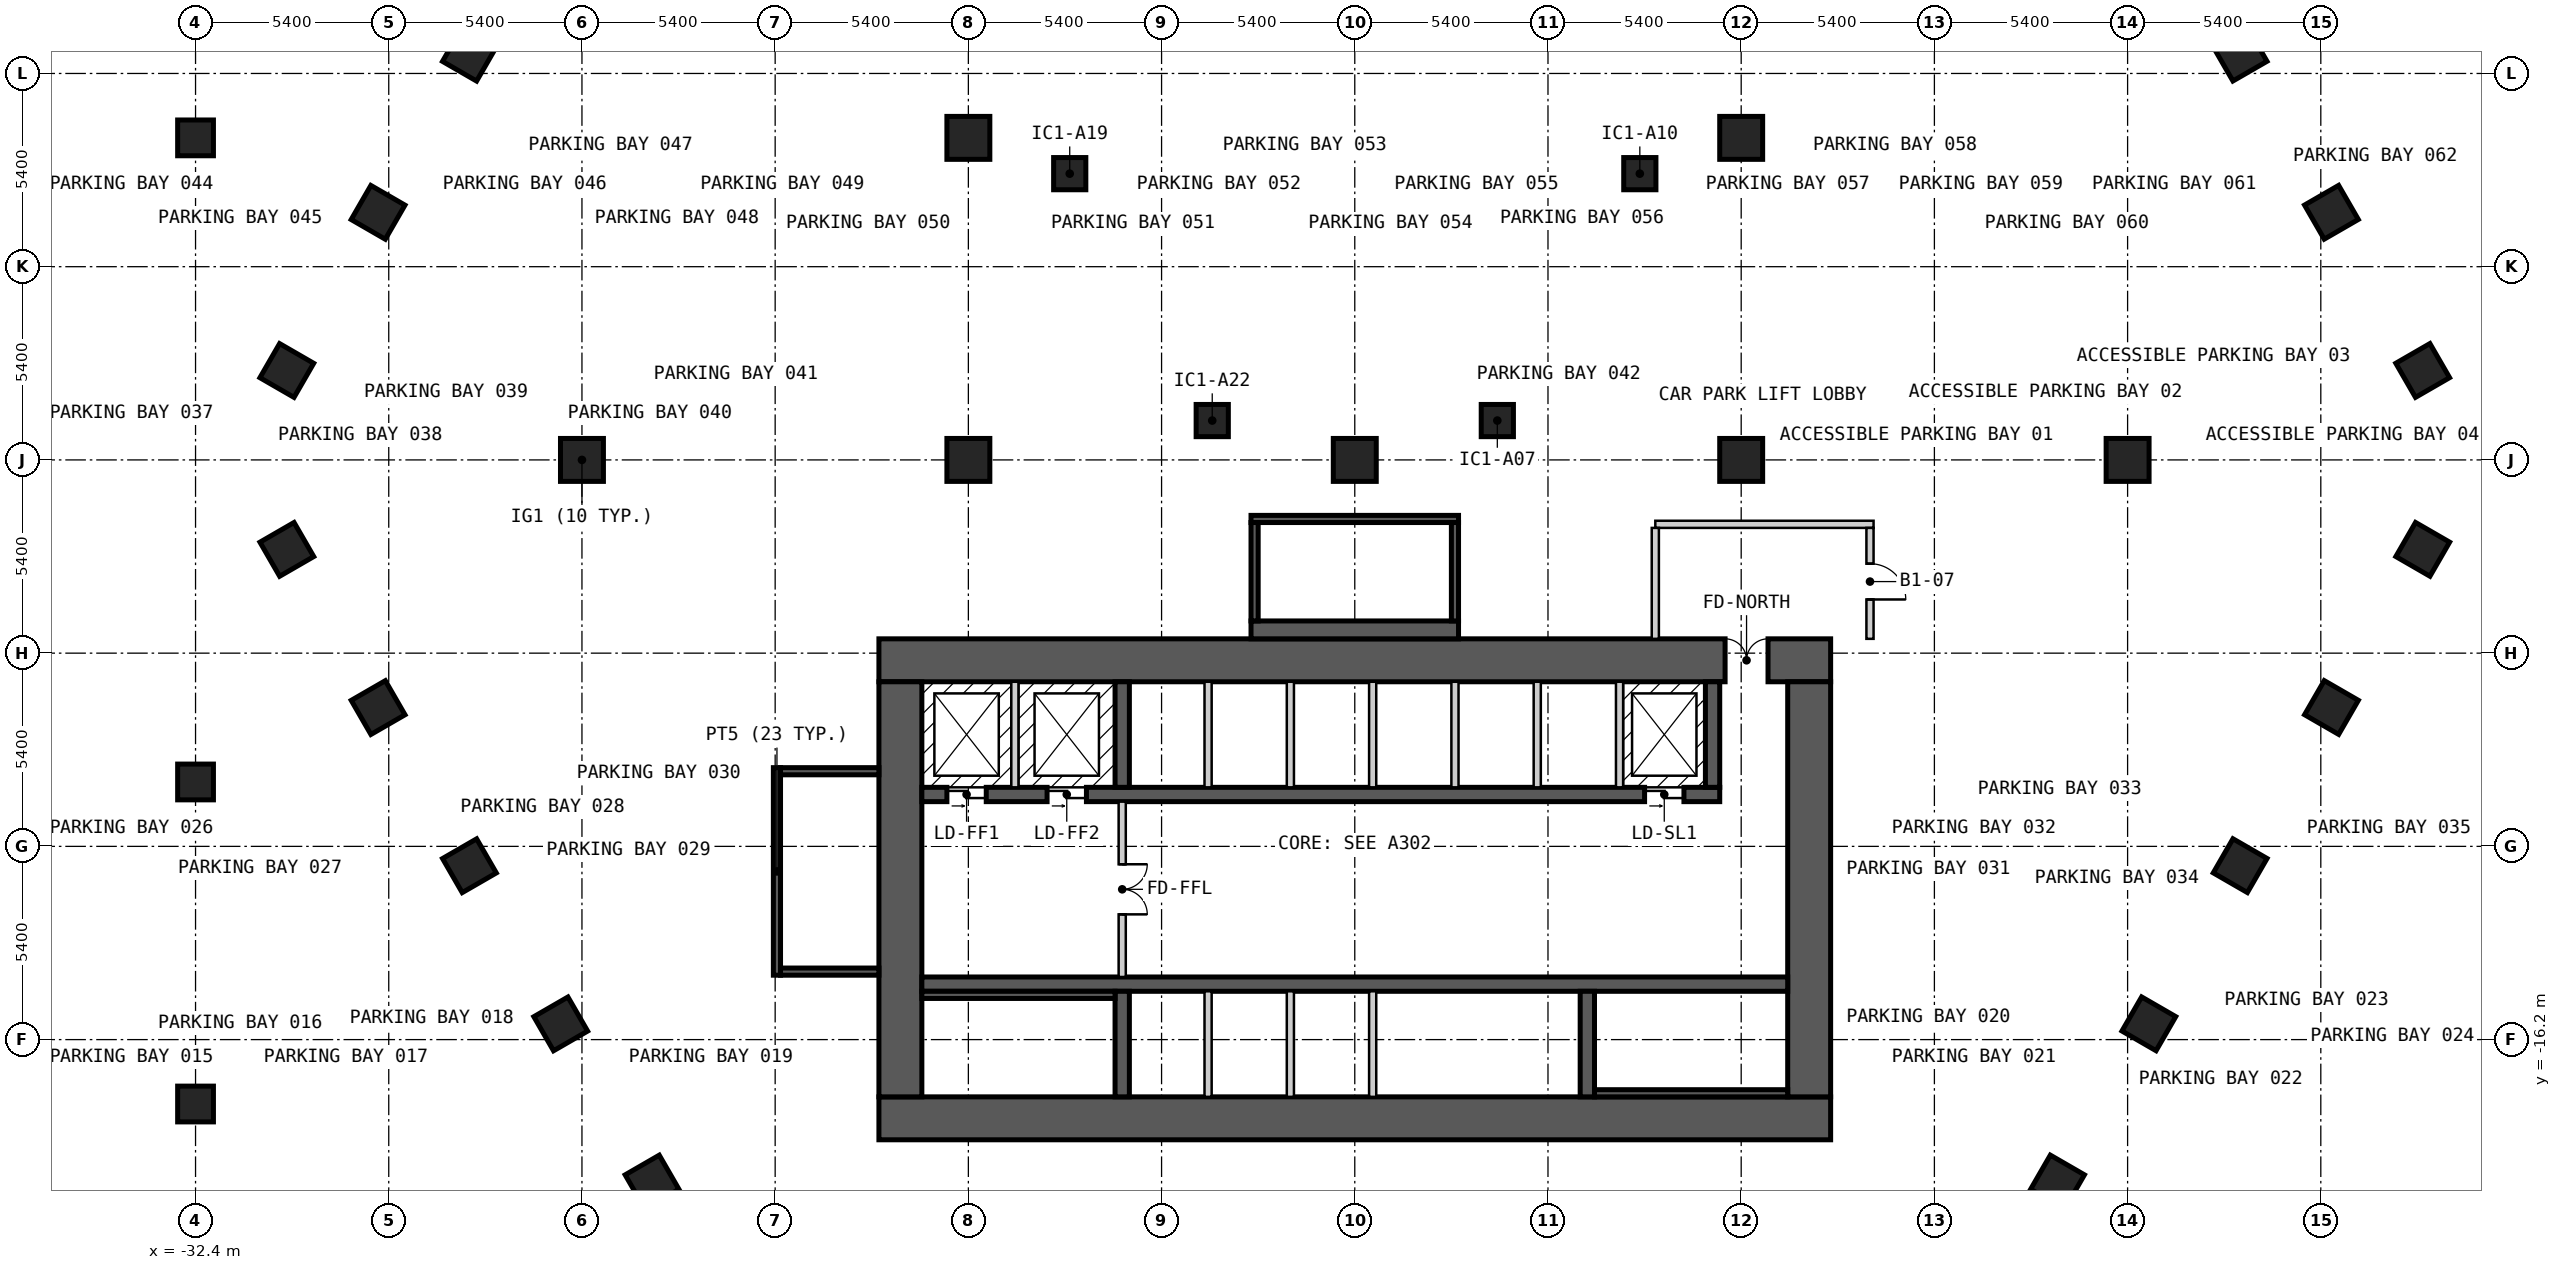
"""IFC4 building model, lengths in metres.
Left out: names, types, materials, properties, quantities, classifications, styles, units other than length and angle.
Written with IfcOpenShell. Run it as: python <this file> out.ifc"""

import sys

from ifc_helpers import new_model, si_unit, direction, frame, frame_2d, origin, origin_2d, place, context, subcontext, project, spatial, rectangle, extrude, element, fill, save


model = new_model("IFC4")
c1 = context("Model", 3, precision=1e-05, world=origin(), true_north=direction((0.0, 1.0)))
c2 = subcontext(c1, "Body", "Model", "MODEL_VIEW")
j1 = project(units=[si_unit("LENGTHUNIT", "METRE"), si_unit("PLANEANGLEUNIT", "RADIAN")], contexts=[c1])
p1 = place(None, origin())
s1 = spatial("IfcSite", under=j1, at=p1, CompositionType="ELEMENT")
p2 = place(p1, origin())
s2 = spatial("IfcBuilding", under=s1, at=p2, CompositionType="ELEMENT")
p3 = place(p2, frame((0.0, 0.0, -4.2)))
s3 = spatial("IfcBuildingStorey", under=s2, at=p3, CompositionType="ELEMENT", Elevation=-4.2)
for number, where, z_axis, x_axis in (
    (1, (-24.746, 11.339, 0.0), (0.0, 0.0, 1.0), (-0.5, -0.866, 0.0)),
    (2, (-27.298, 6.919, 0.0), (0.0, 0.0, 1.0), (-0.5, -0.866, 0.0)),
    (3, (-29.849, 2.499, 0.0), (0.0, 0.0, 1.0), (-0.5, -0.866, 0.0)),
    (4, (-29.848, -2.5, 0.0), (0.0, 0.0, 1.0), (0.5, -0.866, 0.0)),
    (5, (-27.297, -6.921, 0.0), (0.0, 0.0, 1.0), (0.5, -0.866, 0.0)),
    (6, (-24.745, -11.341, 0.0), (0.0, 0.0, 1.0), (0.5, -0.866, 0.0)),
    (7, (-22.193, -15.761, 0.0), (0.0, 0.0, 1.0), (0.5, -0.866, 0.0)),
    (8, (-19.641, -20.181, 0.0), (0.0, 0.0, 1.0), (0.5, -0.866, 0.0)),
    (9, (19.642, -20.18, 0.0), (0.0, 0.0, 1.0), (0.5, 0.866, 0.0)),
    (10, (22.194, -15.759, 0.0), (0.0, 0.0, 1.0), (0.5, 0.866, 0.0)),
    (11, (24.746, -11.339, 0.0), (0.0, 0.0, 1.0), (0.5, 0.866, 0.0)),
    (12, (27.298, -6.919, 0.0), (0.0, 0.0, 1.0), (0.5, 0.866, 0.0)),
    (13, (29.849, -2.499, 0.0), (0.0, 0.0, 1.0), (0.5, 0.866, 0.0)),
    (14, (29.848, 2.5, 0.0), (0.0, 0.0, 1.0), (-0.5, 0.866, 0.0)),
    (15, (27.297, 6.921, 0.0), (0.0, 0.0, 1.0), (-0.5, 0.866, 0.0)),
    (16, (24.745, 11.341, 0.0), (0.0, 0.0, 1.0), (-0.5, 0.866, 0.0)),
):
    element("IfcColumn", number, at=place(p3, frame(where, z_axis=z_axis, x_axis=x_axis)), inside=s3, PredefinedType="COLUMN", context=c2, shape_type="SweptSolid", body=[
        extrude(rectangle(XDim=1.1, YDim=1.1, at=origin_2d()), origin(), (0.0, 0.0, 1.0), 4.2),
    ])
for number, where, z_axis, x_axis in (
    (17, (3.984, 1.1, 0.0), (0.0, 0.0, 1.0), (1.0, 0.0, 0.0)),
    (18, (7.967, 8.0, 0.0), (0.0, 0.0, 1.0), (1.0, 0.0, 0.0)),
    (19, (-7.967, 8.0, 0.0), (0.0, 0.0, 1.0), (1.0, 0.0, 0.0)),
    (20, (-3.984, 1.1, 0.0), (0.0, 0.0, 1.0), (1.0, 0.0, 0.0)),
):
    element("IfcColumn", number, at=place(p3, frame(where, z_axis=z_axis, x_axis=x_axis)), inside=s3, PredefinedType="COLUMN", context=c2, shape_type="SweptSolid", body=[
        extrude(rectangle(XDim=0.9, YDim=0.9, at=origin_2d()), origin(), (0.0, 0.0, 1.0), 4.2),
    ])
for number, where, z_axis, x_axis in (
    (21, (-21.6, 0.0, 0.0), (0.0, 0.0, 1.0), (1.0, 0.0, 0.0)),
    (22, (-10.8, 0.0, 0.0), (0.0, 0.0, 1.0), (1.0, 0.0, 0.0)),
    (23, (-10.8, 9.0, 0.0), (0.0, 0.0, 1.0), (1.0, 0.0, 0.0)),
    (24, (0.0, 0.0, 0.0), (0.0, 0.0, 1.0), (1.0, 0.0, 0.0)),
    (25, (10.8, 0.0, 0.0), (0.0, 0.0, 1.0), (1.0, 0.0, 0.0)),
    (26, (10.8, 9.0, 0.0), (0.0, 0.0, 1.0), (1.0, 0.0, 0.0)),
    (27, (21.6, 0.0, 0.0), (0.0, 0.0, 1.0), (1.0, 0.0, 0.0)),
):
    element("IfcColumn", number, at=place(p3, frame(where, z_axis=z_axis, x_axis=x_axis)), inside=s3, PredefinedType="COLUMN", context=c2, shape_type="SweptSolid", body=[
        extrude(rectangle(XDim=1.2, YDim=1.2, at=origin_2d()), origin(), (0.0, 0.0, 1.0), 4.2),
    ])
for number, where, z_axis, x_axis in (
    (28, (-32.4, -18.0, 0.0), (0.0, 0.0, 1.0), (1.0, 0.0, 0.0)),
    (29, (-32.4, -9.0, 0.0), (0.0, 0.0, 1.0), (1.0, 0.0, 0.0)),
    (30, (-32.4, 9.0, 0.0), (0.0, 0.0, 1.0), (1.0, 0.0, 0.0)),
):
    element("IfcColumn", number, at=place(p3, frame(where, z_axis=z_axis, x_axis=x_axis)), inside=s3, PredefinedType="COLUMN", context=c2, shape_type="SweptSolid", body=[
        extrude(rectangle(XDim=1.0, YDim=1.0, at=origin_2d()), origin(), (0.0, 0.0, 1.0), 4.2),
    ])
p4 = place(p3, frame((-13.3, -18.4, 0.0), z_axis=(0.0, 0.0, 1.0), x_axis=(1.0, 0.0, 0.0)))
e31 = element("IfcWall", 31, at=p4, inside=s3, PredefinedType="SHEAR", context=c2, shape_type="SweptSolid", body=[
    extrude(rectangle(XDim=26.6, YDim=1.2, at=frame_2d((13.3, 0.0))), origin(), (0.0, 0.0, 1.0), 3.75),
])
p5 = place(p3, frame((-13.3, -5.6, 0.0), z_axis=(0.0, 0.0, 1.0), x_axis=(1.0, 0.0, 0.0)))
e32 = element("IfcWall", 32, at=p5, inside=s3, PredefinedType="SHEAR", context=c2, shape_type="SweptSolid", body=[
    extrude(rectangle(XDim=26.6, YDim=1.2, at=frame_2d((13.3, 0.0))), origin(), (0.0, 0.0, 1.0), 3.75),
])
p6 = place(p5, frame((23.65, 0.0, 0.0)))
e33 = element("IfcOpeningElement", 33, at=p6, cuts=e32, PredefinedType="OPENING", context=c2, shape_type="SweptSolid", body=[
    extrude(rectangle(XDim=1.2, YDim=2.1, at=frame_2d((0.6, 1.05))), frame((0.0, 0.61, 0.0), z_axis=(0.0, -1.0, 0.0), x_axis=(1.0, 0.0, 0.0)), (0.0, 0.0, 1.0), 1.22),
])
for number, where, z_axis, x_axis in (
    (34, (-12.7, -17.8, 0.0), (0.0, 0.0, 1.0), (0.0, 1.0, 0.0)),
    (35, (12.7, -17.8, 0.0), (0.0, 0.0, 1.0), (0.0, 1.0, 0.0)),
):
    element("IfcWall", number, at=place(p3, frame(where, z_axis=z_axis, x_axis=x_axis)), inside=s3, PredefinedType="SHEAR", context=c2, shape_type="SweptSolid", body=[
        extrude(rectangle(XDim=11.6, YDim=1.2, at=frame_2d((5.8, 0.0))), origin(), (0.0, 0.0, 1.0), 3.75),
    ])
p7 = place(p3, frame((-12.1, -14.65, 0.0), z_axis=(0.0, 0.0, 1.0), x_axis=(1.0, 0.0, 0.0)))
e36 = element("IfcWall", 36, at=p7, inside=s3, PredefinedType="SHEAR", context=c2, shape_type="SweptSolid", body=[
    extrude(rectangle(XDim=24.2, YDim=0.4, at=frame_2d((12.1, 0.0))), origin(), (0.0, 0.0, 1.0), 3.75),
])
p8 = place(p3, frame((-12.1, -9.35, 0.0), z_axis=(0.0, 0.0, 1.0), x_axis=(1.0, 0.0, 0.0)))
e37 = element("IfcWall", 37, at=p8, inside=s3, PredefinedType="SHEAR", context=c2, shape_type="SweptSolid", body=[
    extrude(rectangle(XDim=22.3, YDim=0.4, at=frame_2d((11.15, 0.0))), origin(), (0.0, 0.0, 1.0), 3.75),
])
p9 = place(p8, frame((0.7, 0.0, 0.0)))
e38 = element("IfcOpeningElement", 38, at=p9, cuts=e37, PredefinedType="OPENING", context=c2, shape_type="SweptSolid", body=[
    extrude(rectangle(XDim=1.1, YDim=2.1, at=frame_2d((0.55, 1.05))), frame((0.0, 0.21, 0.0), z_axis=(0.0, -1.0, 0.0), x_axis=(1.0, 0.0, 0.0)), (0.0, 0.0, 1.0), 0.42),
])
p10 = place(p8, frame((3.5, 0.0, 0.0)))
e39 = element("IfcOpeningElement", 39, at=p10, cuts=e37, PredefinedType="OPENING", context=c2, shape_type="SweptSolid", body=[
    extrude(rectangle(XDim=1.1, YDim=2.1, at=frame_2d((0.55, 1.05))), frame((0.0, 0.21, 0.0), z_axis=(0.0, -1.0, 0.0), x_axis=(1.0, 0.0, 0.0)), (0.0, 0.0, 1.0), 0.42),
])
p11 = place(p8, frame((20.2, 0.0, 0.0)))
e40 = element("IfcOpeningElement", 40, at=p11, cuts=e37, PredefinedType="OPENING", context=c2, shape_type="SweptSolid", body=[
    extrude(rectangle(XDim=1.1, YDim=2.1, at=frame_2d((0.55, 1.05))), frame((0.0, 0.21, 0.0), z_axis=(0.0, -1.0, 0.0), x_axis=(1.0, 0.0, 0.0)), (0.0, 0.0, 1.0), 0.42),
])
for number, where, z_axis, x_axis in (
    (41, (-6.5, -17.8, 0.0), (0.0, 0.0, 1.0), (0.0, 1.0, 0.0)),
    (42, (6.5, -17.8, 0.0), (0.0, 0.0, 1.0), (0.0, 1.0, 0.0)),
    (43, (-6.5, -9.15, 0.0), (0.0, 0.0, 1.0), (0.0, 1.0, 0.0)),
    (44, (10.0, -9.15, 0.0), (0.0, 0.0, 1.0), (0.0, 1.0, 0.0)),
):
    element("IfcWall", number, at=place(p3, frame(where, z_axis=z_axis, x_axis=x_axis)), inside=s3, PredefinedType="SHEAR", context=c2, shape_type="SweptSolid", body=[
        extrude(rectangle(XDim=2.95, YDim=0.4, at=frame_2d((1.475, 0.0))), origin(), (0.0, 0.0, 1.0), 3.75),
    ])
p12 = place(p3, frame((8.4, -1.8, 0.0), z_axis=(0.0, 0.0, 1.0), x_axis=(1.0, 0.0, 0.0)))
e45 = element("IfcWall", 45, at=p12, inside=s3, PredefinedType="PARTITIONING", context=c2, shape_type="SweptSolid", body=[
    extrude(rectangle(XDim=6.1, YDim=0.2, at=frame_2d((3.05, 0.0))), origin(), (0.0, 0.0, 1.0), 3.75),
])
p13 = place(p3, frame((8.4, -5.0, 0.0), z_axis=(0.0, 0.0, 1.0), x_axis=(0.0, 1.0, 0.0)))
e46 = element("IfcWall", 46, at=p13, inside=s3, PredefinedType="PARTITIONING", context=c2, shape_type="SweptSolid", body=[
    extrude(rectangle(XDim=3.1, YDim=0.2, at=frame_2d((1.55, 0.0))), origin(), (0.0, 0.0, 1.0), 3.75),
])
p14 = place(p3, frame((14.4, -5.0, 0.0), z_axis=(0.0, 0.0, 1.0), x_axis=(0.0, 1.0, 0.0)))
e47 = element("IfcWall", 47, at=p14, inside=s3, PredefinedType="PARTITIONING", context=c2, shape_type="SweptSolid", body=[
    extrude(rectangle(XDim=3.1, YDim=0.2, at=frame_2d((1.55, 0.0))), origin(), (0.0, 0.0, 1.0), 3.75),
])
p15 = place(p14, frame((2.1, 0.0, 0.0), z_axis=(0.0, 0.0, 1.0), x_axis=(-1.0, 0.0, 0.0)))
e48 = element("IfcOpeningElement", 48, at=p15, cuts=e47, PredefinedType="OPENING", context=c2, shape_type="SweptSolid", body=[
    extrude(rectangle(XDim=1.0, YDim=2.1, at=frame_2d((0.5, 1.05))), frame((0.0, 0.11, 0.0), z_axis=(0.0, -1.0, 0.0), x_axis=(1.0, 0.0, 0.0)), (0.0, 0.0, 1.0), 0.22),
])
p16 = place(p3, frame((-16.15, -14.4, 0.0), z_axis=(0.0, 0.0, 1.0), x_axis=(0.0, 1.0, 0.0)))
e49 = element("IfcWall", 49, at=p16, inside=s3, PredefinedType="SOLIDWALL", context=c2, shape_type="SweptSolid", body=[
    extrude(rectangle(XDim=5.8, YDim=0.2, at=frame_2d((2.9, 0.0))), origin(), (0.0, 0.0, 1.0), 3.75),
])
for number, where, z_axis, x_axis in (
    (50, (-16.05, -14.3, 0.0), (0.0, 0.0, 1.0), (1.0, 0.0, 0.0)),
    (51, (-16.05, -8.7, 0.0), (0.0, 0.0, 1.0), (1.0, 0.0, 0.0)),
):
    element("IfcWall", number, at=place(p3, frame(where, z_axis=z_axis, x_axis=x_axis)), inside=s3, PredefinedType="SOLIDWALL", context=c2, shape_type="SweptSolid", body=[
        extrude(rectangle(XDim=2.75, YDim=0.2, at=frame_2d((1.375, 0.0))), origin(), (0.0, 0.0, 1.0), 3.75),
    ])
p17 = place(p3, frame((-12.1, -14.95, 0.0), z_axis=(0.0, 0.0, 1.0), x_axis=(1.0, 0.0, 0.0)))
e52 = element("IfcWall", 52, at=p17, inside=s3, PredefinedType="SOLIDWALL", context=c2, shape_type="SweptSolid", body=[
    extrude(rectangle(XDim=5.4, YDim=0.2, at=frame_2d((2.7, 0.0))), origin(), (0.0, 0.0, 1.0), 3.75),
])
p18 = place(p3, frame((-9.5, -9.15, 0.0), z_axis=(0.0, 0.0, 1.0), x_axis=(0.0, 1.0, 0.0)))
e53 = element("IfcWall", 53, at=p18, inside=s3, PredefinedType="SOLIDWALL", context=c2, shape_type="SweptSolid", body=[
    extrude(rectangle(XDim=2.95, YDim=0.2, at=frame_2d((1.475, 0.0))), origin(), (0.0, 0.0, 1.0), 3.75),
])
p19 = place(p3, frame((-6.5, -14.45, 0.0), z_axis=(0.0, 0.0, 1.0), x_axis=(0.0, 1.0, 0.0)))
e54 = element("IfcWall", 54, at=p19, inside=s3, PredefinedType="PARTITIONING", context=c2, shape_type="SweptSolid", body=[
    extrude(rectangle(XDim=4.9, YDim=0.2, at=frame_2d((2.45, 0.0))), origin(), (0.0, 0.0, 1.0), 3.75),
])
p20 = place(p19, frame((3.15, 0.0, 0.0), z_axis=(0.0, 0.0, 1.0), x_axis=(-1.0, 0.0, 0.0)))
e55 = element("IfcOpeningElement", 55, at=p20, cuts=e54, PredefinedType="OPENING", context=c2, shape_type="SweptSolid", body=[
    extrude(rectangle(XDim=1.4, YDim=2.1, at=frame_2d((0.7, 1.05))), frame((0.0, 0.11, 0.0), z_axis=(0.0, -1.0, 0.0), x_axis=(1.0, 0.0, 0.0)), (0.0, 0.0, 1.0), 0.22),
])
for number, where, z_axis, x_axis in (
    (56, (-4.1, -17.8, 0.0), (0.0, 0.0, 1.0), (0.0, 1.0, 0.0)),
    (57, (-4.1, -9.15, 0.0), (0.0, 0.0, 1.0), (0.0, 1.0, 0.0)),
    (58, (-1.8, -17.8, 0.0), (0.0, 0.0, 1.0), (0.0, 1.0, 0.0)),
    (59, (-1.8, -9.15, 0.0), (0.0, 0.0, 1.0), (0.0, 1.0, 0.0)),
    (60, (0.5, -17.8, 0.0), (0.0, 0.0, 1.0), (0.0, 1.0, 0.0)),
    (61, (0.5, -9.15, 0.0), (0.0, 0.0, 1.0), (0.0, 1.0, 0.0)),
    (62, (2.8, -9.15, 0.0), (0.0, 0.0, 1.0), (0.0, 1.0, 0.0)),
    (63, (5.1, -9.15, 0.0), (0.0, 0.0, 1.0), (0.0, 1.0, 0.0)),
):
    element("IfcWall", number, at=place(p3, frame(where, z_axis=z_axis, x_axis=x_axis)), inside=s3, PredefinedType="SOLIDWALL", context=c2, shape_type="SweptSolid", body=[
        extrude(rectangle(XDim=2.95, YDim=0.2, at=frame_2d((1.475, 0.0))), origin(), (0.0, 0.0, 1.0), 3.75),
    ])
p21 = place(p3, frame((6.7, -17.7, 0.0), z_axis=(0.0, 0.0, 1.0), x_axis=(1.0, 0.0, 0.0)))
e64 = element("IfcWall", 64, at=p21, inside=s3, PredefinedType="SOLIDWALL", context=c2, shape_type="SweptSolid", body=[
    extrude(rectangle(XDim=5.4, YDim=0.2, at=frame_2d((2.7, 0.0))), origin(), (0.0, 0.0, 1.0), 3.75),
])
p22 = place(p3, frame((7.4, -9.15, 0.0), z_axis=(0.0, 0.0, 1.0), x_axis=(0.0, 1.0, 0.0)))
e65 = element("IfcWall", 65, at=p22, inside=s3, PredefinedType="SOLIDWALL", context=c2, shape_type="SweptSolid", body=[
    extrude(rectangle(XDim=2.95, YDim=0.2, at=frame_2d((1.475, 0.0))), origin(), (0.0, 0.0, 1.0), 3.75),
])
p23 = place(p3, frame((-2.9, -4.75, 0.0), z_axis=(0.0, 0.0, 1.0), x_axis=(1.0, 0.0, 0.0)))
e66 = element("IfcWall", 66, at=p23, inside=s3, PredefinedType="SOLIDWALL", context=c2, shape_type="SweptSolid", body=[
    extrude(rectangle(XDim=5.8, YDim=0.5, at=frame_2d((2.9, 0.0))), origin(), (0.0, 0.0, 1.0), 3.75),
])
p24 = place(p3, frame((-2.9, -1.65, 0.0), z_axis=(0.0, 0.0, 1.0), x_axis=(1.0, 0.0, 0.0)))
e67 = element("IfcWall", 67, at=p24, inside=s3, PredefinedType="SOLIDWALL", context=c2, shape_type="SweptSolid", body=[
    extrude(rectangle(XDim=5.8, YDim=0.2, at=frame_2d((2.9, 0.0))), origin(), (0.0, 0.0, 1.0), 3.75),
])
for number, where, z_axis, x_axis in (
    (68, (-2.8, -4.5, 0.0), (0.0, 0.0, 1.0), (0.0, 1.0, 0.0)),
    (69, (2.8, -4.5, 0.0), (0.0, 0.0, 1.0), (0.0, 1.0, 0.0)),
):
    element("IfcWall", number, at=place(p3, frame(where, z_axis=z_axis, x_axis=x_axis)), inside=s3, PredefinedType="SOLIDWALL", context=c2, shape_type="SweptSolid", body=[
        extrude(rectangle(XDim=2.75, YDim=0.2, at=frame_2d((1.375, 0.0))), origin(), (0.0, 0.0, 1.0), 3.75),
    ])
p25 = place(p15, origin())
e70 = element("IfcDoor", 70, at=p25, inside=s3, OperationType="SINGLE_SWING_RIGHT", PredefinedType="DOOR", context=c2, shape_type="SweptSolid", body=[
    extrude(rectangle(XDim=1.0, YDim=2.1, at=frame_2d((0.5, 1.05))), frame((0.0, 0.025, 0.0), z_axis=(0.0, -1.0, 0.0), x_axis=(1.0, 0.0, 0.0)), (0.0, 0.0, 1.0), 0.05),
])
fill(e48, e70)
p26 = place(p9, origin())
e71 = element("IfcDoor", 71, at=p26, inside=s3, OperationType="DOUBLE_DOOR_SLIDING", PredefinedType="DOOR", context=c2, shape_type="SweptSolid", body=[
    extrude(rectangle(XDim=1.1, YDim=2.1, at=frame_2d((0.55, 1.05))), frame((0.0, 0.025, 0.0), z_axis=(0.0, -1.0, 0.0), x_axis=(1.0, 0.0, 0.0)), (0.0, 0.0, 1.0), 0.05),
])
fill(e38, e71)
p27 = place(p10, origin())
e72 = element("IfcDoor", 72, at=p27, inside=s3, OperationType="DOUBLE_DOOR_SLIDING", PredefinedType="DOOR", context=c2, shape_type="SweptSolid", body=[
    extrude(rectangle(XDim=1.1, YDim=2.1, at=frame_2d((0.55, 1.05))), frame((0.0, 0.025, 0.0), z_axis=(0.0, -1.0, 0.0), x_axis=(1.0, 0.0, 0.0)), (0.0, 0.0, 1.0), 0.05),
])
fill(e39, e72)
p28 = place(p11, origin())
e73 = element("IfcDoor", 73, at=p28, inside=s3, OperationType="DOUBLE_DOOR_SLIDING", PredefinedType="DOOR", context=c2, shape_type="SweptSolid", body=[
    extrude(rectangle(XDim=1.1, YDim=2.1, at=frame_2d((0.55, 1.05))), frame((0.0, 0.025, 0.0), z_axis=(0.0, -1.0, 0.0), x_axis=(1.0, 0.0, 0.0)), (0.0, 0.0, 1.0), 0.05),
])
fill(e40, e73)
p29 = place(p20, origin())
e74 = element("IfcDoor", 74, at=p29, inside=s3, OperationType="DOUBLE_DOOR_SINGLE_SWING", PredefinedType="DOOR", context=c2, shape_type="SweptSolid", body=[
    extrude(rectangle(XDim=1.4, YDim=2.1, at=frame_2d((0.7, 1.05))), frame((0.0, 0.025, 0.0), z_axis=(0.0, -1.0, 0.0), x_axis=(1.0, 0.0, 0.0)), (0.0, 0.0, 1.0), 0.05),
])
fill(e55, e74)
p30 = place(p6, origin())
e75 = element("IfcDoor", 75, at=p30, inside=s3, OperationType="DOUBLE_DOOR_SINGLE_SWING", PredefinedType="DOOR", context=c2, shape_type="SweptSolid", body=[
    extrude(rectangle(XDim=1.2, YDim=2.1, at=frame_2d((0.6, 1.05))), frame((0.0, 0.025, 0.0), z_axis=(0.0, -1.0, 0.0), x_axis=(1.0, 0.0, 0.0)), (0.0, 0.0, 1.0), 0.05),
])
fill(e33, e75)
save(model, sys.argv[1])
